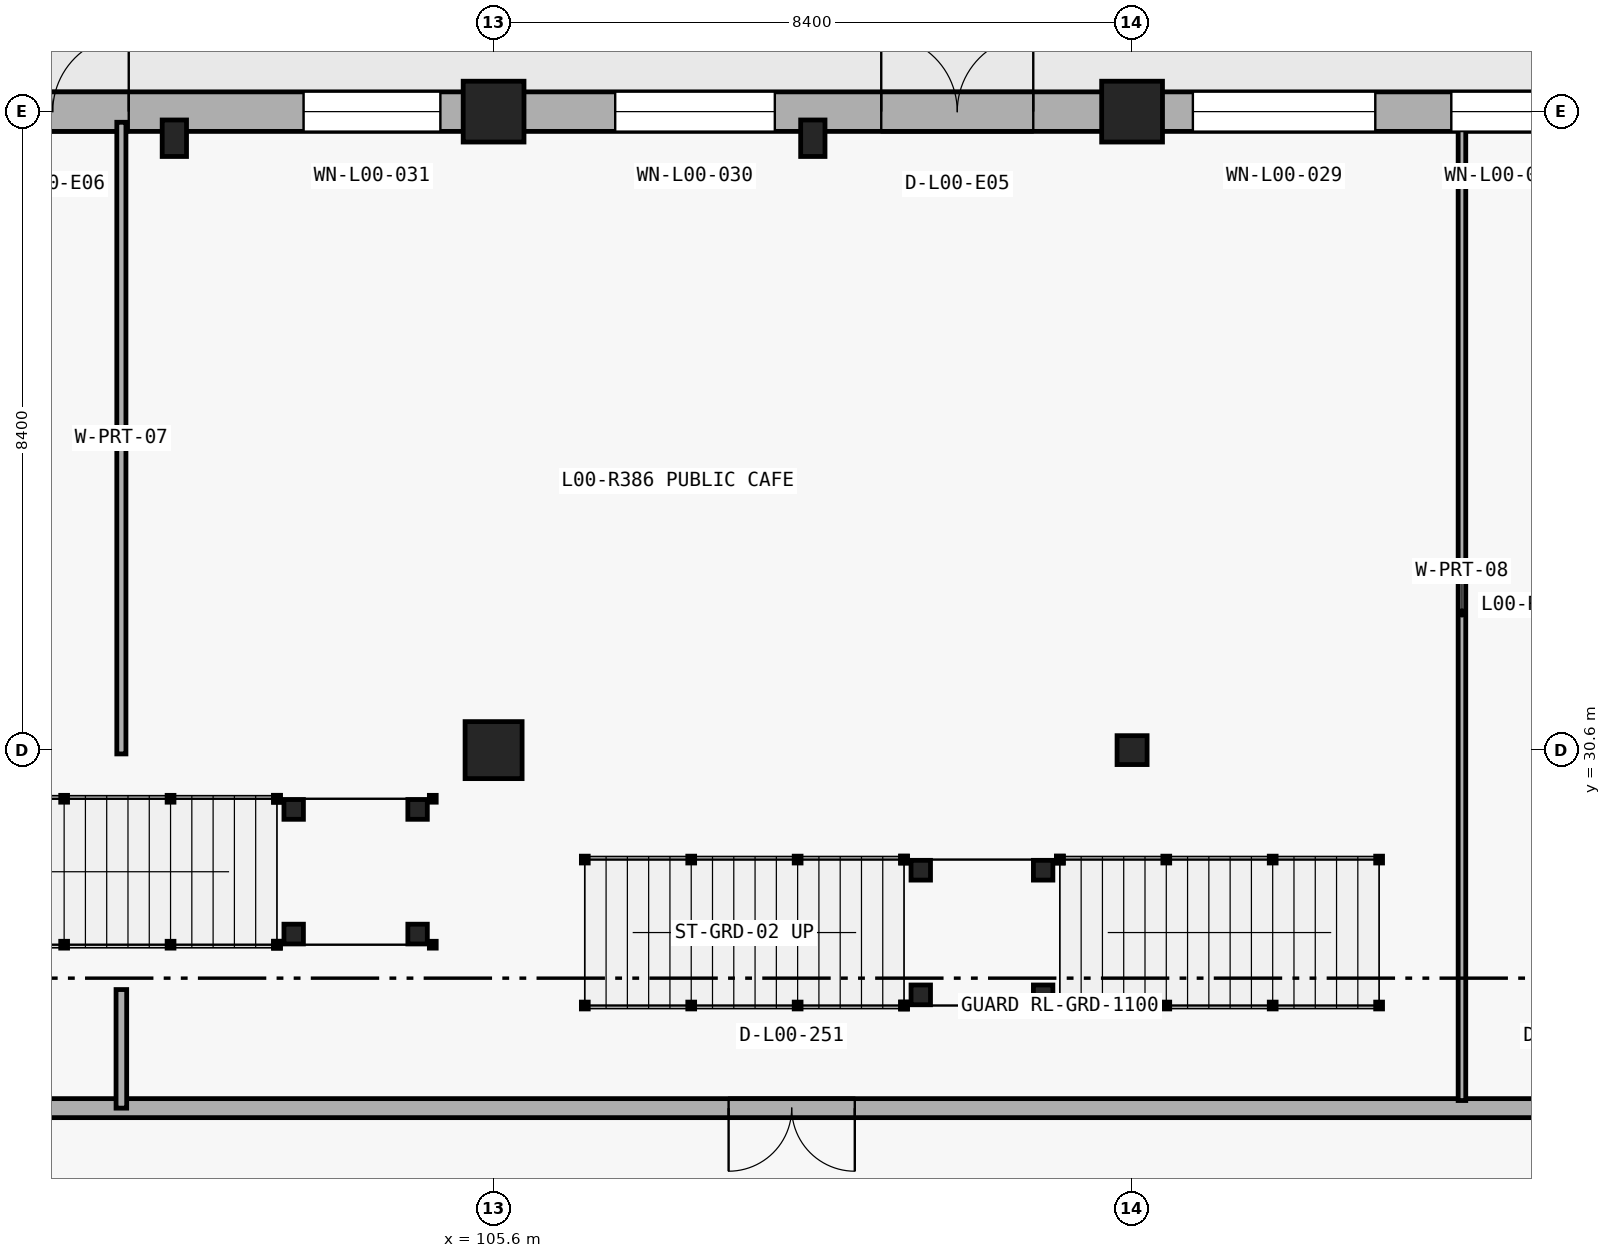
"""IFC4 building model, lengths in metres.
Left out: names, types, materials, properties, quantities, classifications, styles, units other than length and angle.
Written with IfcOpenShell. Run it as: python <this file> out.ifc"""

import sys

from ifc_helpers import new_model, si_unit, direction, frame, frame_2d, origin_with_axes, origin_2d_with_axis, place, context, subcontext, project, spatial, rectangle, circle, i_section, extrude, element, fill, save


model = new_model("IFC4")
c1 = context("Model", 3, precision=1e-05, world=origin_with_axes(), true_north=direction((0.0, 1.0)))
c2 = subcontext(c1, "Body", "Model", "MODEL_VIEW")
j1 = project(units=[si_unit("LENGTHUNIT", "METRE"), si_unit("PLANEANGLEUNIT", "RADIAN")], contexts=[c1])
p1 = place(None, origin_with_axes())
s1 = spatial("IfcSite", under=j1, at=p1, CompositionType="ELEMENT")
p2 = place(p1, origin_with_axes())
s2 = spatial("IfcBuilding", under=s1, at=p2, CompositionType="ELEMENT")
p3 = place(p2, origin_with_axes())
s3 = spatial("IfcBuildingStorey", under=s2, at=p3, CompositionType="ELEMENT", Elevation=0.0)
p4 = place(None, frame((121.75, 39.0, 0.0), z_axis=(0.0, 0.0, 1.0), x_axis=(-1.0, 0.0, 0.0)))
e1 = element("IfcWall", 1, at=p4, inside=s3, PredefinedType="SOLIDWALL", context=c2, shape_type="SweptSolid", body=[
    extrude(rectangle(XDim=24.5, YDim=0.52, at=frame_2d((12.25, 0.0), x_axis=(1.0, 0.0))), origin_with_axes(), (0.0, 0.0, 1.0), 4.724),
])
p5 = place(None, frame((111.7, 39.0, 0.0), z_axis=(0.0, 0.0, 1.0), x_axis=(-1.0, 0.0, 0.0)))
e2 = element("IfcOpeningElement", 2, at=p5, cuts=e1, PredefinedType="OPENING", context=c2, shape_type="SweptSolid", body=[
    extrude(rectangle(XDim=2.0, YDim=2.5, at=frame_2d((0.0, 1.25), x_axis=(1.0, 0.0))), frame((0.0, 0.27, 0.0), z_axis=(0.0, -1.0, 0.0), x_axis=(1.0, 0.0, 0.0)), (0.0, 0.0, 1.0), 0.54),
])
p6 = place(None, frame((99.8, 39.0, 0.0), z_axis=(0.0, 0.0, 1.0), x_axis=(-1.0, 0.0, 0.0)))
e3 = element("IfcOpeningElement", 3, at=p6, cuts=e1, PredefinedType="OPENING", context=c2, shape_type="SweptSolid", body=[
    extrude(rectangle(XDim=2.0, YDim=2.5, at=frame_2d((0.0, 1.25), x_axis=(1.0, 0.0))), frame((0.0, 0.27, 0.0), z_axis=(0.0, -1.0, 0.0), x_axis=(1.0, 0.0, 0.0)), (0.0, 0.0, 1.0), 0.54),
])
p7 = place(None, frame((118.875, 39.0, 0.95), z_axis=(0.0, 0.0, 1.0), x_axis=(-1.0, 0.0, 0.0)))
e4 = element("IfcOpeningElement", 4, at=p7, cuts=e1, PredefinedType="OPENING", context=c2, shape_type="SweptSolid", body=[
    extrude(rectangle(XDim=1.35, YDim=2.5, at=frame_2d((0.0, 1.25), x_axis=(1.0, 0.0))), frame((0.0, 0.27, 0.0), z_axis=(0.0, -1.0, 0.0), x_axis=(1.0, 0.0, 0.0)), (0.0, 0.0, 1.0), 0.54),
])
p8 = place(None, frame((116.0, 39.0, 2.7), z_axis=(0.0, 0.0, 1.0), x_axis=(-1.0, 0.0, 0.0)))
e5 = element("IfcOpeningElement", 5, at=p8, cuts=e1, PredefinedType="OPENING", context=c2, shape_type="SweptSolid", body=[
    extrude(rectangle(XDim=2.4, YDim=1.4, at=frame_2d((0.0, 0.7), x_axis=(1.0, 0.0))), frame((0.0, 0.27, 0.0), z_axis=(0.0, -1.0, 0.0), x_axis=(1.0, 0.0, 0.0)), (0.0, 0.0, 1.0), 0.54),
])
p9 = place(None, frame((108.25, 39.0, 2.7), z_axis=(0.0, 0.0, 1.0), x_axis=(-1.0, 0.0, 0.0)))
e6 = element("IfcOpeningElement", 6, at=p9, cuts=e1, PredefinedType="OPENING", context=c2, shape_type="SweptSolid", body=[
    extrude(rectangle(XDim=2.1, YDim=1.3, at=frame_2d((0.0, 0.65), x_axis=(1.0, 0.0))), frame((0.0, 0.27, 0.0), z_axis=(0.0, -1.0, 0.0), x_axis=(1.0, 0.0, 0.0)), (0.0, 0.0, 1.0), 0.54),
])
p10 = place(None, frame((104.0, 39.0, 2.75), z_axis=(0.0, 0.0, 1.0), x_axis=(-1.0, 0.0, 0.0)))
e7 = element("IfcOpeningElement", 7, at=p10, cuts=e1, PredefinedType="OPENING", context=c2, shape_type="SweptSolid", body=[
    extrude(rectangle(XDim=1.8, YDim=1.2, at=frame_2d((0.0, 0.6), x_axis=(1.0, 0.0))), frame((0.0, 0.27, 0.0), z_axis=(0.0, -1.0, 0.0), x_axis=(1.0, 0.0, 0.0)), (0.0, 0.0, 1.0), 0.54),
])
p11 = place(None, frame((52.95, 25.89, 0.0), z_axis=(0.0, 0.0, 1.0), x_axis=(1.0, 0.0, 0.0)))
e8 = element("IfcWall", 8, at=p11, inside=s3, PredefinedType="PARTITIONING", context=c2, shape_type="SweptSolid", body=[
    extrude(rectangle(XDim=68.71, YDim=0.25, at=frame_2d((34.355, 0.0), x_axis=(1.0, 0.0))), origin_with_axes(), (0.0, 0.0, 1.0), 5.08),
])
p12 = place(None, frame((64.313, 25.89, 0.0), z_axis=(0.0, 0.0, 1.0), x_axis=(1.0, 0.0, 0.0)))
e9 = element("IfcOpeningElement", 9, at=p12, cuts=e8, PredefinedType="OPENING", context=c2, shape_type="SweptSolid", body=[
    extrude(rectangle(XDim=1.56, YDim=2.28, at=frame_2d((0.0, 1.14), x_axis=(1.0, 0.0))), frame((0.0, 0.135, 0.0), z_axis=(0.0, -1.0, 0.0), x_axis=(1.0, 0.0, 0.0)), (0.0, 0.0, 1.0), 0.27),
])
p13 = place(None, frame((88.028, 25.89, 0.0), z_axis=(0.0, 0.0, 1.0), x_axis=(1.0, 0.0, 0.0)))
e10 = element("IfcOpeningElement", 10, at=p13, cuts=e8, PredefinedType="OPENING", context=c2, shape_type="SweptSolid", body=[
    extrude(rectangle(XDim=0.92, YDim=2.14, at=frame_2d((0.0, 1.07), x_axis=(1.0, 0.0))), frame((0.0, 0.135, 0.0), z_axis=(0.0, -1.0, 0.0), x_axis=(1.0, 0.0, 0.0)), (0.0, 0.0, 1.0), 0.27),
])
p14 = place(None, frame((109.522, 25.89, 0.0), z_axis=(0.0, 0.0, 1.0), x_axis=(1.0, 0.0, 0.0)))
e11 = element("IfcOpeningElement", 11, at=p14, cuts=e8, PredefinedType="OPENING", context=c2, shape_type="SweptSolid", body=[
    extrude(rectangle(XDim=1.66, YDim=2.38, at=frame_2d((0.0, 1.19), x_axis=(1.0, 0.0))), frame((0.0, 0.135, 0.0), z_axis=(0.0, -1.0, 0.0), x_axis=(1.0, 0.0, 0.0)), (0.0, 0.0, 1.0), 0.27),
])
p15 = place(None, frame((119.838, 25.89, 0.0), z_axis=(0.0, 0.0, 1.0), x_axis=(1.0, 0.0, 0.0)))
e12 = element("IfcOpeningElement", 12, at=p15, cuts=e8, PredefinedType="OPENING", context=c2, shape_type="SweptSolid", body=[
    extrude(rectangle(XDim=0.91, YDim=2.12, at=frame_2d((0.0, 1.06), x_axis=(1.0, 0.0))), frame((0.0, 0.135, 0.0), z_axis=(0.0, -1.0, 0.0), x_axis=(1.0, 0.0, 0.0)), (0.0, 0.0, 1.0), 0.27),
])
p16 = place(None, frame((67.683, 25.89, 1.05), z_axis=(0.0, 0.0, 1.0), x_axis=(1.0, 0.0, 0.0)))
e13 = element("IfcOpeningElement", 13, at=p16, cuts=e8, PredefinedType="OPENING", context=c2, shape_type="SweptSolid", body=[
    extrude(rectangle(XDim=1.9, YDim=1.5, at=frame_2d((0.0, 0.75), x_axis=(1.0, 0.0))), frame((0.0, 0.135, 0.0), z_axis=(0.0, -1.0, 0.0), x_axis=(1.0, 0.0, 0.0)), (0.0, 0.0, 1.0), 0.27),
])
p17 = place(None, frame((91.543, 25.89, 1.05), z_axis=(0.0, 0.0, 1.0), x_axis=(1.0, 0.0, 0.0)))
e14 = element("IfcOpeningElement", 14, at=p17, cuts=e8, PredefinedType="OPENING", context=c2, shape_type="SweptSolid", body=[
    extrude(rectangle(XDim=1.55, YDim=1.35, at=frame_2d((0.0, 0.675), x_axis=(1.0, 0.0))), frame((0.0, 0.135, 0.0), z_axis=(0.0, -1.0, 0.0), x_axis=(1.0, 0.0, 0.0)), (0.0, 0.0, 1.0), 0.27),
])
p18 = place(None, frame((118.34, 25.99, 0.0), z_axis=(0.0, 0.0, 1.0), x_axis=(0.0, 1.0, 0.0)))
e15 = element("IfcWall", 15, at=p18, inside=s3, PredefinedType="PARTITIONING", context=c2, shape_type="SweptSolid", body=[
    extrude(rectangle(XDim=12.83, YDim=0.1, at=frame_2d((6.415, 0.0), x_axis=(1.0, 0.0))), origin_with_axes(), (0.0, 0.0, 1.0), 5.08),
])
p19 = place(None, frame((100.703, 25.89, 0.0), z_axis=(0.0, 0.0, 1.0), x_axis=(0.0, 1.0, 0.0)))
e16 = element("IfcWall", 16, at=p19, inside=s3, PredefinedType="PARTITIONING", context=c2, shape_type="SweptSolid", body=[
    extrude(rectangle(XDim=1.56, YDim=0.14, at=frame_2d((0.78, 0.0), x_axis=(1.0, 0.0))), origin_with_axes(), (0.0, 0.0, 1.0), 5.08),
])
p20 = place(None, frame((100.703, 30.55, 0.0), z_axis=(0.0, 0.0, 1.0), x_axis=(0.0, 1.0, 0.0)))
e17 = element("IfcWall", 17, at=p20, inside=s3, PredefinedType="PARTITIONING", context=c2, shape_type="SweptSolid", body=[
    extrude(rectangle(XDim=8.31, YDim=0.12, at=frame_2d((4.155, 0.0), x_axis=(1.0, 0.0))), origin_with_axes(), (0.0, 0.0, 1.0), 5.08),
])
p21 = place(None, frame((105.6, 30.6, 0.0), z_axis=(0.0, 0.0, 1.0), x_axis=(1.0, 0.0, 0.0)))
e18 = element("IfcColumn", 18, at=p21, inside=s3, PredefinedType="COLUMN", context=c2, shape_type="SweptSolid", body=[
    extrude(rectangle(XDim=0.75, YDim=0.75, at=origin_2d_with_axis()), origin_with_axes(), (0.0, 0.0, 1.0), 5.4),
])
p22 = place(None, frame((105.6, 39.0, 0.0), z_axis=(0.0, 0.0, 1.0), x_axis=(1.0, 0.0, 0.0)))
e19 = element("IfcColumn", 19, at=p22, inside=s3, PredefinedType="COLUMN", context=c2, shape_type="SweptSolid", body=[
    extrude(circle(Radius=0.4, at=origin_2d_with_axis()), origin_with_axes(), (0.0, 0.0, 1.0), 5.4),
])
p23 = place(None, frame((114.0, 30.6, 0.0), z_axis=(0.0, 0.0, 1.0), x_axis=(1.0, 0.0, 0.0)))
e20 = element("IfcColumn", 20, at=p23, inside=s3, PredefinedType="COLUMN", context=c2, shape_type="SweptSolid", body=[
    extrude(i_section(OverallWidth=0.395, OverallDepth=0.38, WebThickness=0.019, FlangeThickness=0.03, at=origin_2d_with_axis()), origin_with_axes(), (0.0, 0.0, 1.0), 5.4),
])
p24 = place(None, frame((114.0, 39.0, 0.0), z_axis=(0.0, 0.0, 1.0), x_axis=(1.0, 0.0, 0.0)))
e21 = element("IfcColumn", 21, at=p24, inside=s3, PredefinedType="COLUMN", context=c2, shape_type="SweptSolid", body=[
    extrude(circle(Radius=0.4, at=origin_2d_with_axis()), origin_with_axes(), (0.0, 0.0, 1.0), 5.4),
])
for number, where, z_axis, x_axis in (
    (22, (111.22, 27.38, -0.29), (0.0, 0.0, 1.0), (1.0, 0.0, 0.0)),
    (23, (111.22, 29.02, -0.29), (0.0, 0.0, 1.0), (1.0, 0.0, 0.0)),
    (24, (112.83, 27.38, -0.29), (0.0, 0.0, 1.0), (1.0, 0.0, 0.0)),
    (25, (112.83, 29.02, -0.29), (0.0, 0.0, 1.0), (1.0, 0.0, 0.0)),
):
    element("IfcColumn", number, at=place(None, frame(where, z_axis=z_axis, x_axis=x_axis)), inside=s3, PredefinedType="COLUMN", context=c2, shape_type="SweptSolid", body=[
        extrude(i_section(OverallWidth=0.256, OverallDepth=0.26, WebThickness=0.011, FlangeThickness=0.017, at=origin_2d_with_axis()), origin_with_axes(), (0.0, 0.0, 1.0), 2.81),
    ])
for number, where, z_axis, x_axis in (
    (26, (102.97, 28.18, -0.29), (0.0, 0.0, 1.0), (1.0, 0.0, 0.0)),
    (27, (102.97, 29.82, -0.29), (0.0, 0.0, 1.0), (1.0, 0.0, 0.0)),
    (28, (104.6, 28.18, -0.29), (0.0, 0.0, 1.0), (1.0, 0.0, 0.0)),
    (29, (104.6, 29.82, -0.29), (0.0, 0.0, 1.0), (1.0, 0.0, 0.0)),
):
    element("IfcColumn", number, at=place(None, frame(where, z_axis=z_axis, x_axis=x_axis)), inside=s3, PredefinedType="COLUMN", context=c2, shape_type="SweptSolid", body=[
        extrude(i_section(OverallWidth=0.256, OverallDepth=0.26, WebThickness=0.011, FlangeThickness=0.017, at=origin_2d_with_axis()), origin_with_axes(), (0.0, 0.0, 1.0), 5.51),
    ])
p25 = place(None, frame((111.7, 39.0, 0.0), z_axis=(0.0, 0.0, 1.0), x_axis=(1.0, 0.0, 0.0)))
e30 = element("IfcDoor", 30, at=p25, inside=s3, OperationType="DOUBLE_DOOR_SINGLE_SWING", PredefinedType="DOOR", context=c2, shape_type="SweptSolid", body=[
    extrude(rectangle(XDim=2.0, YDim=2.5, at=frame_2d((0.0, 1.25), x_axis=(1.0, 0.0))), frame((0.0, 0.04, 0.0), z_axis=(0.0, -1.0, 0.0), x_axis=(1.0, 0.0, 0.0)), (0.0, 0.0, 1.0), 0.08),
])
fill(e2, e30)
p26 = place(None, frame((99.8, 39.0, 0.0), z_axis=(0.0, 0.0, 1.0), x_axis=(1.0, 0.0, 0.0)))
e31 = element("IfcDoor", 31, at=p26, inside=s3, OperationType="DOUBLE_DOOR_SINGLE_SWING", PredefinedType="DOOR", context=c2, shape_type="SweptSolid", body=[
    extrude(rectangle(XDim=2.0, YDim=2.5, at=frame_2d((0.0, 1.25), x_axis=(1.0, 0.0))), frame((0.0, 0.04, 0.0), z_axis=(0.0, -1.0, 0.0), x_axis=(1.0, 0.0, 0.0)), (0.0, 0.0, 1.0), 0.08),
])
fill(e3, e31)
p27 = place(None, frame((109.522, 25.89, 0.0), z_axis=(0.0, 0.0, 1.0), x_axis=(-1.0, 0.0, 0.0)))
e32 = element("IfcDoor", 32, at=p27, inside=s3, OperationType="DOUBLE_DOOR_SINGLE_SWING", PredefinedType="DOOR", context=c2, shape_type="SweptSolid", body=[
    extrude(rectangle(XDim=1.66, YDim=2.38, at=frame_2d((0.0, 1.19), x_axis=(1.0, 0.0))), frame((0.0, 0.04, 0.0), z_axis=(0.0, -1.0, 0.0), x_axis=(1.0, 0.0, 0.0)), (0.0, 0.0, 1.0), 0.08),
])
fill(e11, e32)
for number, where, z_axis, x_axis in (
    (33, (101.4, 38.65, 0.0), (0.0, 0.0, 1.0), (1.0, 0.0, 0.0)),
    (34, (109.8, 38.65, 0.0), (0.0, 0.0, 1.0), (1.0, 0.0, 0.0)),
):
    element("IfcColumn", number, at=place(None, frame(where, z_axis=z_axis, x_axis=x_axis)), inside=s3, PredefinedType="PILASTER", context=c2, shape_type="SweptSolid", body=[
        extrude(rectangle(XDim=0.32, YDim=0.48, at=origin_2d_with_axis()), origin_with_axes(), (0.0, 0.0, 1.0), 5.4),
    ])
p28 = place(None, frame((118.875, 39.0, 0.95), z_axis=(0.0, 0.0, 1.0), x_axis=(-1.0, 0.0, 0.0)))
e35 = element("IfcWindow", 35, at=p28, inside=s3, PartitioningType="SINGLE_PANEL", PredefinedType="WINDOW", context=c2, shape_type="SweptSolid", body=[
    extrude(rectangle(XDim=1.35, YDim=2.5, at=frame_2d((0.0, 1.25), x_axis=(1.0, 0.0))), frame((0.0, 0.03, 0.0), z_axis=(0.0, -1.0, 0.0), x_axis=(1.0, 0.0, 0.0)), (0.0, 0.0, 1.0), 0.06),
])
fill(e4, e35)
p29 = place(None, frame((116.0, 39.0, 2.7), z_axis=(0.0, 0.0, 1.0), x_axis=(-1.0, 0.0, 0.0)))
e36 = element("IfcWindow", 36, at=p29, inside=s3, PartitioningType="SINGLE_PANEL", PredefinedType="WINDOW", context=c2, shape_type="SweptSolid", body=[
    extrude(rectangle(XDim=2.4, YDim=1.4, at=frame_2d((0.0, 0.7), x_axis=(1.0, 0.0))), frame((0.0, 0.03, 0.0), z_axis=(0.0, -1.0, 0.0), x_axis=(1.0, 0.0, 0.0)), (0.0, 0.0, 1.0), 0.06),
])
fill(e5, e36)
p30 = place(None, frame((108.25, 39.0, 2.7), z_axis=(0.0, 0.0, 1.0), x_axis=(-1.0, 0.0, 0.0)))
e37 = element("IfcWindow", 37, at=p30, inside=s3, PartitioningType="SINGLE_PANEL", PredefinedType="WINDOW", context=c2, shape_type="SweptSolid", body=[
    extrude(rectangle(XDim=2.1, YDim=1.3, at=frame_2d((0.0, 0.65), x_axis=(1.0, 0.0))), frame((0.0, 0.03, 0.0), z_axis=(0.0, -1.0, 0.0), x_axis=(1.0, 0.0, 0.0)), (0.0, 0.0, 1.0), 0.06),
])
fill(e6, e37)
p31 = place(None, frame((104.0, 39.0, 2.75), z_axis=(0.0, 0.0, 1.0), x_axis=(-1.0, 0.0, 0.0)))
e38 = element("IfcWindow", 38, at=p31, inside=s3, PartitioningType="SINGLE_PANEL", PredefinedType="WINDOW", context=c2, shape_type="SweptSolid", body=[
    extrude(rectangle(XDim=1.8, YDim=1.2, at=frame_2d((0.0, 0.6), x_axis=(1.0, 0.0))), frame((0.0, 0.03, 0.0), z_axis=(0.0, -1.0, 0.0), x_axis=(1.0, 0.0, 0.0)), (0.0, 0.0, 1.0), 0.06),
])
fill(e7, e38)
save(model, sys.argv[1])
